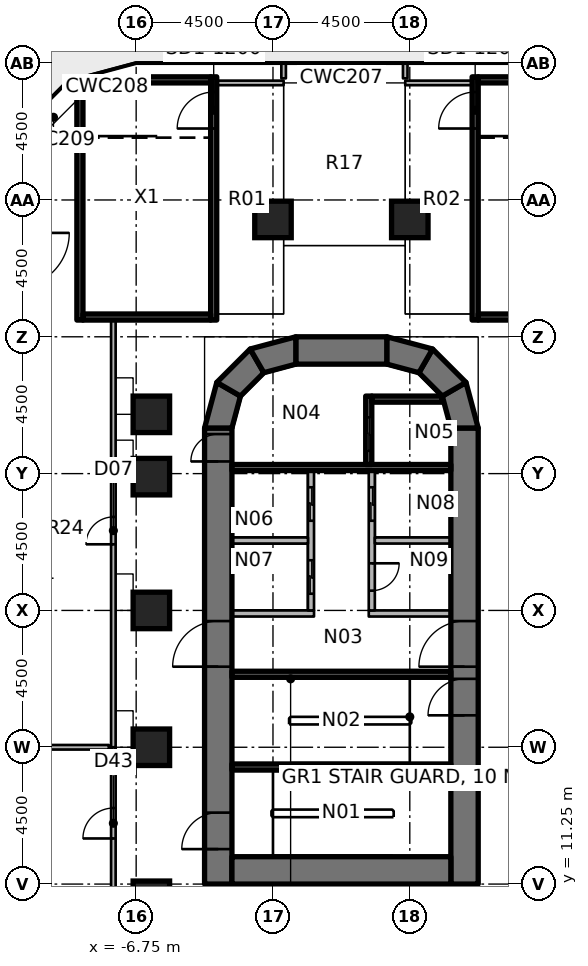
"""IFC4 building model, lengths in metres.
Left out: names, types, materials, properties, quantities, classifications, styles, units other than length and angle.
Written with IfcOpenShell. Run it as: python <this file> out.ifc"""

import sys

from ifc_helpers import new_model, si_unit, direction, frame, frame_2d, origin, origin_2d, place, context, subcontext, project, spatial, polyline, rectangle, outline, extrude, element, fill, save


model = new_model("IFC4")
c1 = context("Model", 3, precision=1e-05, world=origin(), true_north=direction((0.0, 1.0)))
c2 = subcontext(c1, "Body", "Model", "MODEL_VIEW")
j1 = project(units=[si_unit("LENGTHUNIT", "METRE"), si_unit("PLANEANGLEUNIT", "RADIAN")], contexts=[c1])
p1 = place(None, origin())
s1 = spatial("IfcSite", under=j1, at=p1, CompositionType="ELEMENT")
p2 = place(p1, origin())
s2 = spatial("IfcBuilding", under=s1, at=p2, CompositionType="ELEMENT")
p3 = place(p2, frame((0.0, 0.0, 22.0)))
s3 = spatial("IfcBuildingStorey", under=s2, at=p3, CompositionType="ELEMENT", Elevation=22.0)
for number, where, z_axis, x_axis in (
    (1, (-6.25, 10.75, 0.0), (0.0, 0.0, 1.0), (1.0, 0.0, 0.0)),
    (2, (-6.25, 15.75, 0.0), (0.0, 0.0, 1.0), (1.0, 0.0, 0.0)),
    (3, (-6.25, 20.25, 0.0), (0.0, 0.0, 1.0), (1.0, 0.0, 0.0)),
    (4, (-6.25, 24.65, 0.0), (0.0, 0.0, 1.0), (1.0, 0.0, 0.0)),
    (5, (-6.25, 26.7, 0.0), (0.0, 0.0, 1.0), (1.0, 0.0, 0.0)),
    (6, (-2.25, 33.11, 0.0), (0.0, 0.0, 1.0), (1.0, 0.0, 0.0)),
    (7, (2.25, 33.11, 0.0), (0.0, 0.0, 1.0), (1.0, 0.0, 0.0)),
):
    element("IfcColumn", number, at=place(p3, frame(where, z_axis=z_axis, x_axis=x_axis)), inside=s3, PredefinedType="COLUMN", context=c2, shape_type="SweptSolid", body=[
        extrude(rectangle(XDim=1.2, YDim=1.2, at=origin_2d()), origin(), (0.0, 0.0, 1.0), 4.85),
    ])
p4 = place(p3, frame((-4.05, 11.25, 0.0), z_axis=(0.0, 0.0, 1.0), x_axis=(0.0, 1.0, 0.0)))
e8 = element("IfcWall", 8, at=p4, inside=s3, PredefinedType="SHEAR", context=c2, shape_type="SweptSolid", body=[
    extrude(rectangle(XDim=15.0, YDim=0.9, at=frame_2d((7.5, 0.0))), origin(), (0.0, 0.0, 1.0), 5.0),
])
p5 = place(p4, frame((7.15, 0.0, 0.0)))
e9 = element("IfcOpeningElement", 9, at=p5, cuts=e8, PredefinedType="OPENING", context=c2, shape_type="SweptSolid", body=[
    extrude(rectangle(XDim=1.5, YDim=2.3, at=frame_2d((0.75, 1.15))), frame((0.0, 0.46, 0.0), z_axis=(0.0, -1.0, 0.0), x_axis=(1.0, 0.0, 0.0)), (0.0, 0.0, 1.0), 0.92),
])
p6 = place(p4, frame((13.9, 0.0, 0.0)))
e10 = element("IfcOpeningElement", 10, at=p6, cuts=e8, PredefinedType="OPENING", context=c2, shape_type="SweptSolid", body=[
    extrude(rectangle(XDim=0.9, YDim=2.1, at=frame_2d((0.45, 1.05))), frame((0.0, 0.46, 0.0), z_axis=(0.0, -1.0, 0.0), x_axis=(1.0, 0.0, 0.0)), (0.0, 0.0, 1.0), 0.92),
])
p7 = place(p4, frame((1.15, 0.0, 0.0)))
e11 = element("IfcOpeningElement", 11, at=p7, cuts=e8, PredefinedType="OPENING", context=c2, shape_type="SweptSolid", body=[
    extrude(rectangle(XDim=1.2, YDim=2.1, at=frame_2d((0.6, 1.05))), frame((0.0, 0.46, 0.0), z_axis=(0.0, -1.0, 0.0), x_axis=(1.0, 0.0, 0.0)), (0.0, 0.0, 1.0), 0.92),
])
p8 = place(p3, frame((4.05, 11.25, 0.0), z_axis=(0.0, 0.0, 1.0), x_axis=(0.0, 1.0, 0.0)))
e12 = element("IfcWall", 12, at=p8, inside=s3, PredefinedType="SHEAR", context=c2, shape_type="SweptSolid", body=[
    extrude(rectangle(XDim=15.0, YDim=0.9, at=frame_2d((7.5, 0.0))), origin(), (0.0, 0.0, 1.0), 5.0),
])
p9 = place(p8, frame((7.15, 0.0, 0.0)))
e13 = element("IfcOpeningElement", 13, at=p9, cuts=e12, PredefinedType="OPENING", context=c2, shape_type="SweptSolid", body=[
    extrude(rectangle(XDim=1.5, YDim=2.3, at=frame_2d((0.75, 1.15))), frame((0.0, 0.46, 0.0), z_axis=(0.0, -1.0, 0.0), x_axis=(1.0, 0.0, 0.0)), (0.0, 0.0, 1.0), 0.92),
])
p10 = place(p8, frame((5.55, 0.0, 0.0)))
e14 = element("IfcOpeningElement", 14, at=p10, cuts=e12, PredefinedType="OPENING", context=c2, shape_type="SweptSolid", body=[
    extrude(rectangle(XDim=1.2, YDim=2.1, at=frame_2d((0.6, 1.05))), frame((0.0, 0.46, 0.0), z_axis=(0.0, -1.0, 0.0), x_axis=(1.0, 0.0, 0.0)), (0.0, 0.0, 1.0), 0.92),
])
p11 = place(p3, frame((-3.6, 11.7, 0.0), z_axis=(0.0, 0.0, 1.0), x_axis=(1.0, 0.0, 0.0)))
e15 = element("IfcWall", 15, at=p11, inside=s3, PredefinedType="SHEAR", context=c2, shape_type="SweptSolid", body=[
    extrude(rectangle(XDim=7.2, YDim=0.9, at=frame_2d((3.6, 0.0))), origin(), (0.0, 0.0, 1.0), 5.0),
])
p12 = place(p3, frame((-1.5, 28.8, 0.0), z_axis=(0.0, 0.0, 1.0), x_axis=(1.0, 0.0, 0.0)))
e16 = element("IfcWall", 16, at=p12, inside=s3, PredefinedType="SHEAR", context=c2, shape_type="SweptSolid", body=[
    extrude(rectangle(XDim=3.0, YDim=0.9, at=frame_2d((1.5, 0.0))), origin(), (0.0, 0.0, 1.0), 5.0),
])
p13 = place(p3, origin())
e17 = element("IfcWall", 17, at=p13, inside=s3, PredefinedType="SHEAR", context=c2, shape_type="SweptSolid", body=[
    extrude(outline(polyline([(-4.5, 26.25), (-4.098, 27.75), (-3.319, 27.3), (-3.6, 26.25), (-4.5, 26.25)])), origin(), (0.0, 0.0, 1.0), 5.0),
])
p14 = place(p3, origin())
e18 = element("IfcWall", 18, at=p14, inside=s3, PredefinedType="SHEAR", context=c2, shape_type="SweptSolid", body=[
    extrude(outline(polyline([(-4.098, 27.75), (-3.0, 28.848), (-2.55, 28.069), (-3.319, 27.3), (-4.098, 27.75)])), origin(), (0.0, 0.0, 1.0), 5.0),
])
p15 = place(p3, origin())
e19 = element("IfcWall", 19, at=p15, inside=s3, PredefinedType="SHEAR", context=c2, shape_type="SweptSolid", body=[
    extrude(outline(polyline([(-3.0, 28.848), (-1.5, 29.25), (-1.5, 28.35), (-2.55, 28.069), (-3.0, 28.848)])), origin(), (0.0, 0.0, 1.0), 5.0),
])
p16 = place(p3, origin())
e20 = element("IfcWall", 20, at=p16, inside=s3, PredefinedType="SHEAR", context=c2, shape_type="SweptSolid", body=[
    extrude(outline(polyline([(4.5, 26.25), (4.098, 27.75), (3.319, 27.3), (3.6, 26.25), (4.5, 26.25)])), origin(), (0.0, 0.0, 1.0), 5.0),
])
p17 = place(p3, origin())
e21 = element("IfcWall", 21, at=p17, inside=s3, PredefinedType="SHEAR", context=c2, shape_type="SweptSolid", body=[
    extrude(outline(polyline([(4.098, 27.75), (3.0, 28.848), (2.55, 28.069), (3.319, 27.3), (4.098, 27.75)])), origin(), (0.0, 0.0, 1.0), 5.0),
])
p18 = place(p3, origin())
e22 = element("IfcWall", 22, at=p18, inside=s3, PredefinedType="SHEAR", context=c2, shape_type="SweptSolid", body=[
    extrude(outline(polyline([(3.0, 28.848), (1.5, 29.25), (1.5, 28.35), (2.55, 28.069), (3.0, 28.848)])), origin(), (0.0, 0.0, 1.0), 5.0),
])
p19 = place(p3, frame((-3.6, 24.95, 0.0), z_axis=(0.0, 0.0, 1.0), x_axis=(1.0, 0.0, 0.0)))
e23 = element("IfcWall", 23, at=p19, inside=s3, PredefinedType="SHEAR", context=c2, shape_type="SweptSolid", body=[
    extrude(rectangle(XDim=7.2, YDim=0.2, at=frame_2d((3.6, 0.0))), origin(), (0.0, 0.0, 1.0), 4.85),
])
p20 = place(p3, frame((0.9, 27.3, 0.0), z_axis=(0.0, 0.0, 1.0), x_axis=(0.0, -1.0, 0.0)))
e24 = element("IfcWall", 24, at=p20, inside=s3, PredefinedType="SHEAR", context=c2, shape_type="SweptSolid", body=[
    extrude(rectangle(XDim=2.25, YDim=0.2, at=frame_2d((1.125, 0.0))), origin(), (0.0, 0.0, 1.0), 4.85),
])
p21 = place(p20, frame((0.7, 0.0, 0.0)))
e25 = element("IfcOpeningElement", 25, at=p21, cuts=e24, PredefinedType="OPENING", context=c2, shape_type="SweptSolid", body=[
    extrude(rectangle(XDim=1.1, YDim=2.3, at=frame_2d((0.55, 1.15))), frame((0.0, 0.11, 0.0), z_axis=(0.0, -1.0, 0.0), x_axis=(1.0, 0.0, 0.0)), (0.0, 0.0, 1.0), 0.22),
])
p22 = place(p3, origin())
e26 = element("IfcWall", 26, at=p22, inside=s3, PredefinedType="SHEAR", context=c2, shape_type="SweptSolid", body=[
    extrude(outline(polyline([(1.0, 27.1), (3.341, 27.1), (3.291, 27.284), (3.275, 27.3), (1.0, 27.3), (1.0, 27.1)])), origin(), (0.0, 0.0, 1.0), 4.85),
])
for number, where, z_axis, x_axis in (
    (27, (-3.6, 18.15, 0.0), (0.0, 0.0, 1.0), (1.0, 0.0, 0.0)),
    (28, (-3.6, 15.1, 0.0), (0.0, 0.0, 1.0), (1.0, 0.0, 0.0)),
):
    element("IfcWall", number, at=place(p3, frame(where, z_axis=z_axis, x_axis=x_axis)), inside=s3, PredefinedType="SHEAR", context=c2, shape_type="SweptSolid", body=[
        extrude(rectangle(XDim=7.2, YDim=0.2, at=frame_2d((3.6, 0.0))), origin(), (0.0, 0.0, 1.0), 4.85),
    ])
p23 = place(p3, frame((-3.6, 20.15, 0.0), z_axis=(0.0, 0.0, 1.0), x_axis=(1.0, 0.0, 0.0)))
e29 = element("IfcWall", 29, at=p23, inside=s3, PredefinedType="PARTITIONING", context=c2, shape_type="SweptSolid", body=[
    extrude(rectangle(XDim=2.7, YDim=0.2, at=frame_2d((1.35, 0.0))), origin(), (0.0, 0.0, 1.0), 4.85),
])
p24 = place(p3, frame((-1.0, 24.85, 0.0), z_axis=(0.0, 0.0, 1.0), x_axis=(0.0, -1.0, 0.0)))
e30 = element("IfcWall", 30, at=p24, inside=s3, PredefinedType="PARTITIONING", context=c2, shape_type="SweptSolid", body=[
    extrude(rectangle(XDim=4.6, YDim=0.2, at=frame_2d((2.3, 0.0))), origin(), (0.0, 0.0, 1.0), 4.85),
])
p25 = place(p24, frame((0.55, 0.0, 0.0)))
e31 = element("IfcOpeningElement", 31, at=p25, cuts=e30, PredefinedType="OPENING", context=c2, shape_type="SweptSolid", body=[
    extrude(rectangle(XDim=1.1, YDim=2.3, at=frame_2d((0.55, 1.15))), frame((0.0, 0.11, 0.0), z_axis=(0.0, -1.0, 0.0), x_axis=(1.0, 0.0, 0.0)), (0.0, 0.0, 1.0), 0.22),
])
p26 = place(p24, frame((2.95, 0.0, 0.0)))
e32 = element("IfcOpeningElement", 32, at=p26, cuts=e30, PredefinedType="OPENING", context=c2, shape_type="SweptSolid", body=[
    extrude(rectangle(XDim=1.1, YDim=2.3, at=frame_2d((0.55, 1.15))), frame((0.0, 0.11, 0.0), z_axis=(0.0, -1.0, 0.0), x_axis=(1.0, 0.0, 0.0)), (0.0, 0.0, 1.0), 0.22),
])
p27 = place(p3, frame((0.9, 20.15, 0.0), z_axis=(0.0, 0.0, 1.0), x_axis=(1.0, 0.0, 0.0)))
e33 = element("IfcWall", 33, at=p27, inside=s3, PredefinedType="PARTITIONING", context=c2, shape_type="SweptSolid", body=[
    extrude(rectangle(XDim=2.7, YDim=0.2, at=frame_2d((1.35, 0.0))), origin(), (0.0, 0.0, 1.0), 4.85),
])
p28 = place(p3, frame((1.0, 24.85, 0.0), z_axis=(0.0, 0.0, 1.0), x_axis=(0.0, -1.0, 0.0)))
e34 = element("IfcWall", 34, at=p28, inside=s3, PredefinedType="PARTITIONING", context=c2, shape_type="SweptSolid", body=[
    extrude(rectangle(XDim=4.6, YDim=0.2, at=frame_2d((2.3, 0.0))), origin(), (0.0, 0.0, 1.0), 4.85),
])
p29 = place(p28, frame((0.55, 0.0, 0.0)))
e35 = element("IfcOpeningElement", 35, at=p29, cuts=e34, PredefinedType="OPENING", context=c2, shape_type="SweptSolid", body=[
    extrude(rectangle(XDim=1.1, YDim=2.3, at=frame_2d((0.55, 1.15))), frame((0.0, 0.11, 0.0), z_axis=(0.0, -1.0, 0.0), x_axis=(1.0, 0.0, 0.0)), (0.0, 0.0, 1.0), 0.22),
])
p30 = place(p28, frame((3.05, 0.0, 0.0)))
e36 = element("IfcOpeningElement", 36, at=p30, cuts=e34, PredefinedType="OPENING", context=c2, shape_type="SweptSolid", body=[
    extrude(rectangle(XDim=0.9, YDim=2.1, at=frame_2d((0.45, 1.05))), frame((0.0, 0.11, 0.0), z_axis=(0.0, -1.0, 0.0), x_axis=(1.0, 0.0, 0.0)), (0.0, 0.0, 1.0), 0.22),
])
for number, where, z_axis, x_axis in (
    (37, (-3.6, 22.55, 0.0), (0.0, 0.0, 1.0), (1.0, 0.0, 0.0)),
    (38, (1.1, 22.55, 0.0), (0.0, 0.0, 1.0), (1.0, 0.0, 0.0)),
):
    element("IfcWall", number, at=place(p3, frame(where, z_axis=z_axis, x_axis=x_axis)), inside=s3, PredefinedType="PARTITIONING", context=c2, shape_type="SweptSolid", body=[
        extrude(rectangle(XDim=2.5, YDim=0.2, at=frame_2d((1.25, 0.0))), origin(), (0.0, 0.0, 1.0), 4.85),
    ])
p31 = place(p3, frame((-8.6, 29.8, 0.0), z_axis=(0.0, 0.0, 1.0), x_axis=(0.0, 1.0, 0.0)))
e39 = element("IfcWall", 39, at=p31, inside=s3, PredefinedType="SHEAR", context=c2, shape_type="SweptSolid", body=[
    extrude(rectangle(XDim=8.0, YDim=0.2, at=frame_2d((4.0, 0.0))), origin(), (0.0, 0.0, 1.0), 4.55),
])
p32 = place(p3, frame((-4.2, 29.8, 0.0), z_axis=(0.0, 0.0, 1.0), x_axis=(0.0, 1.0, 0.0)))
e40 = element("IfcWall", 40, at=p32, inside=s3, PredefinedType="SHEAR", context=c2, shape_type="SweptSolid", body=[
    extrude(rectangle(XDim=8.0, YDim=0.2, at=frame_2d((4.0, 0.0))), origin(), (0.0, 0.0, 1.0), 4.55),
])
p33 = place(p32, frame((6.3, 0.0, 0.0)))
e41 = element("IfcOpeningElement", 41, at=p33, cuts=e40, PredefinedType="OPENING", context=c2, shape_type="SweptSolid", body=[
    extrude(rectangle(XDim=1.2, YDim=2.1, at=frame_2d((0.6, 1.05))), frame((0.0, 0.11, 0.0), z_axis=(0.0, -1.0, 0.0), x_axis=(1.0, 0.0, 0.0)), (0.0, 0.0, 1.0), 0.22),
])
for number, where, z_axis, x_axis in (
    (42, (-8.5, 29.9, 0.0), (0.0, 0.0, 1.0), (1.0, 0.0, 0.0)),
    (43, (-8.5, 37.7, 0.0), (0.0, 0.0, 1.0), (1.0, 0.0, 0.0)),
):
    element("IfcWall", number, at=place(p3, frame(where, z_axis=z_axis, x_axis=x_axis)), inside=s3, PredefinedType="SHEAR", context=c2, shape_type="SweptSolid", body=[
        extrude(rectangle(XDim=4.2, YDim=0.2, at=frame_2d((2.1, 0.0))), origin(), (0.0, 0.0, 1.0), 4.55),
    ])
p34 = place(p3, frame((4.4, 29.8, 0.0), z_axis=(0.0, 0.0, 1.0), x_axis=(0.0, 1.0, 0.0)))
e44 = element("IfcWall", 44, at=p34, inside=s3, PredefinedType="SHEAR", context=c2, shape_type="SweptSolid", body=[
    extrude(rectangle(XDim=8.0, YDim=0.2, at=frame_2d((4.0, 0.0))), origin(), (0.0, 0.0, 1.0), 4.55),
])
p35 = place(p34, frame((6.3, 0.0, 0.0)))
e45 = element("IfcOpeningElement", 45, at=p35, cuts=e44, PredefinedType="OPENING", context=c2, shape_type="SweptSolid", body=[
    extrude(rectangle(XDim=1.2, YDim=2.1, at=frame_2d((0.6, 1.05))), frame((0.0, 0.11, 0.0), z_axis=(0.0, -1.0, 0.0), x_axis=(1.0, 0.0, 0.0)), (0.0, 0.0, 1.0), 0.22),
])
for number, where, z_axis, x_axis in (
    (46, (4.5, 29.9, 0.0), (0.0, 0.0, 1.0), (1.0, 0.0, 0.0)),
    (47, (4.5, 37.7, 0.0), (0.0, 0.0, 1.0), (1.0, 0.0, 0.0)),
):
    element("IfcWall", number, at=place(p3, frame(where, z_axis=z_axis, x_axis=x_axis)), inside=s3, PredefinedType="SHEAR", context=c2, shape_type="SweptSolid", body=[
        extrude(rectangle(XDim=4.2, YDim=0.2, at=frame_2d((2.1, 0.0))), origin(), (0.0, 0.0, 1.0), 4.55),
    ])
p36 = place(p3, frame((-4.1, 37.6, 0.0), z_axis=(0.0, 0.0, 1.0), x_axis=(1.0, 0.0, 0.0)))
e48 = element("IfcWall", 48, at=p36, inside=s3, PredefinedType="PARTITIONING", context=c2, shape_type="SweptSolid", body=[
    extrude(rectangle(XDim=2.2, YDim=0.15, at=frame_2d((1.1, 0.0))), origin(), (0.0, 0.0, 1.0), 4.55),
])
p37 = place(p3, frame((2.1, 37.6, 0.0), z_axis=(0.0, 0.0, 1.0), x_axis=(1.0, 0.0, 0.0)))
e49 = element("IfcWall", 49, at=p37, inside=s3, PredefinedType="PARTITIONING", context=c2, shape_type="SweptSolid", body=[
    extrude(rectangle(XDim=2.2, YDim=0.15, at=frame_2d((1.1, 0.0))), origin(), (0.0, 0.0, 1.0), 4.55),
])
p38 = place(p3, frame((-7.5, 8.25, 0.0), z_axis=(0.0, 0.0, 1.0), x_axis=(0.0, 1.0, 0.0)))
e50 = element("IfcWall", 50, at=p38, inside=s3, PredefinedType="PARTITIONING", context=c2, shape_type="SweptSolid", body=[
    extrude(rectangle(XDim=7.5, YDim=0.15, at=frame_2d((3.75, 0.0))), origin(), (0.0, 0.0, 1.0), 3.93),
])
p39 = place(p38, frame((4.5, 0.0, 0.0)))
e51 = element("IfcOpeningElement", 51, at=p39, cuts=e50, PredefinedType="OPENING", context=c2, shape_type="SweptSolid", body=[
    extrude(rectangle(XDim=1.0, YDim=2.1, at=frame_2d((0.5, 1.05))), frame((0.0, 0.085, 0.0), z_axis=(0.0, -1.0, 0.0), x_axis=(1.0, 0.0, 0.0)), (0.0, 0.0, 1.0), 0.17),
])
p40 = place(p3, frame((-7.5, 15.75, 0.0), z_axis=(0.0, 0.0, 1.0), x_axis=(0.0, 1.0, 0.0)))
e52 = element("IfcWall", 52, at=p40, inside=s3, PredefinedType="PARTITIONING", context=c2, shape_type="SweptSolid", body=[
    extrude(rectangle(XDim=14.25, YDim=0.15, at=frame_2d((7.125, 0.0))), origin(), (0.0, 0.0, 1.0), 4.55),
])
p41 = place(p40, frame((6.675, 0.0, 0.0)))
e53 = element("IfcOpeningElement", 53, at=p41, cuts=e52, PredefinedType="OPENING", context=c2, shape_type="SweptSolid", body=[
    extrude(rectangle(XDim=0.9, YDim=2.1, at=frame_2d((0.45, 1.05))), frame((0.0, 0.085, 0.0), z_axis=(0.0, -1.0, 0.0), x_axis=(1.0, 0.0, 0.0)), (0.0, 0.0, 1.0), 0.17),
])
for number, where, z_axis, x_axis in (
    (54, (2.1, 38.25, 0.0), (0.0, 0.0, 1.0), (0.0, -1.0, 0.0)),
    (55, (-1.9, 37.75, 0.0), (0.0, 0.0, 1.0), (0.0, 1.0, 0.0)),
):
    element("IfcWall", number, at=place(p3, frame(where, z_axis=z_axis, x_axis=x_axis)), inside=s3, PredefinedType="PARTITIONING", context=c2, shape_type="SweptSolid", body=[
        extrude(rectangle(XDim=0.5, YDim=0.15, at=frame_2d((0.25, 0.0))), origin(), (0.0, 0.0, 1.0), 4.55),
    ])
p42 = place(p3, frame((-10.05, 15.75, 0.0), z_axis=(0.0, 0.0, 1.0), x_axis=(1.0, 0.0, 0.0)))
e56 = element("IfcWall", 56, at=p42, inside=s3, PredefinedType="PARTITIONING", context=c2, shape_type="SweptSolid", body=[
    extrude(rectangle(XDim=2.4, YDim=0.15, at=frame_2d((1.2, 0.0))), origin(), (0.0, 0.0, 1.0), 4.55),
])
p43 = place(p5, origin())
e57 = element("IfcDoor", 57, at=p43, inside=s3, OperationType="DOUBLE_DOOR_SINGLE_SWING", PredefinedType="DOOR", context=c2, shape_type="SweptSolid", body=[
    extrude(rectangle(XDim=1.5, YDim=2.3, at=frame_2d((0.75, 1.15))), frame((0.0, 0.025, 0.0), z_axis=(0.0, -1.0, 0.0), x_axis=(1.0, 0.0, 0.0)), (0.0, 0.0, 1.0), 0.05),
])
fill(e9, e57)
p44 = place(p9, origin())
e58 = element("IfcDoor", 58, at=p44, inside=s3, OperationType="DOUBLE_DOOR_SINGLE_SWING", PredefinedType="DOOR", context=c2, shape_type="SweptSolid", body=[
    extrude(rectangle(XDim=1.5, YDim=2.3, at=frame_2d((0.75, 1.15))), frame((0.0, 0.025, 0.0), z_axis=(0.0, -1.0, 0.0), x_axis=(1.0, 0.0, 0.0)), (0.0, 0.0, 1.0), 0.05),
])
fill(e13, e58)
p45 = place(p6, origin())
e59 = element("IfcDoor", 59, at=p45, inside=s3, OperationType="SINGLE_SWING_RIGHT", PredefinedType="DOOR", context=c2, shape_type="SweptSolid", body=[
    extrude(rectangle(XDim=0.9, YDim=2.1, at=frame_2d((0.45, 1.05))), frame((0.0, 0.025, 0.0), z_axis=(0.0, -1.0, 0.0), x_axis=(1.0, 0.0, 0.0)), (0.0, 0.0, 1.0), 0.05),
])
fill(e10, e59)
p46 = place(p10, origin())
e60 = element("IfcDoor", 60, at=p46, inside=s3, OperationType="SINGLE_SWING_RIGHT", PredefinedType="DOOR", context=c2, shape_type="SweptSolid", body=[
    extrude(rectangle(XDim=1.2, YDim=2.1, at=frame_2d((0.6, 1.05))), frame((0.0, 0.025, 0.0), z_axis=(0.0, -1.0, 0.0), x_axis=(1.0, 0.0, 0.0)), (0.0, 0.0, 1.0), 0.05),
])
fill(e14, e60)
p47 = place(p7, origin())
e61 = element("IfcDoor", 61, at=p47, inside=s3, OperationType="SINGLE_SWING_RIGHT", PredefinedType="DOOR", context=c2, shape_type="SweptSolid", body=[
    extrude(rectangle(XDim=1.2, YDim=2.1, at=frame_2d((0.6, 1.05))), frame((0.0, 0.025, 0.0), z_axis=(0.0, -1.0, 0.0), x_axis=(1.0, 0.0, 0.0)), (0.0, 0.0, 1.0), 0.05),
])
fill(e11, e61)
p48 = place(p21, origin())
e62 = element("IfcDoor", 62, at=p48, inside=s3, OperationType="DOUBLE_DOOR_SLIDING", PredefinedType="DOOR", context=c2, shape_type="SweptSolid", body=[
    extrude(rectangle(XDim=1.1, YDim=2.3, at=frame_2d((0.55, 1.15))), frame((0.0, 0.025, 0.0), z_axis=(0.0, -1.0, 0.0), x_axis=(1.0, 0.0, 0.0)), (0.0, 0.0, 1.0), 0.05),
])
fill(e25, e62)
p49 = place(p25, origin())
e63 = element("IfcDoor", 63, at=p49, inside=s3, OperationType="DOUBLE_DOOR_SLIDING", PredefinedType="DOOR", context=c2, shape_type="SweptSolid", body=[
    extrude(rectangle(XDim=1.1, YDim=2.3, at=frame_2d((0.55, 1.15))), frame((0.0, 0.025, 0.0), z_axis=(0.0, -1.0, 0.0), x_axis=(1.0, 0.0, 0.0)), (0.0, 0.0, 1.0), 0.05),
])
fill(e31, e63)
p50 = place(p26, origin())
e64 = element("IfcDoor", 64, at=p50, inside=s3, OperationType="DOUBLE_DOOR_SLIDING", PredefinedType="DOOR", context=c2, shape_type="SweptSolid", body=[
    extrude(rectangle(XDim=1.1, YDim=2.3, at=frame_2d((0.55, 1.15))), frame((0.0, 0.025, 0.0), z_axis=(0.0, -1.0, 0.0), x_axis=(1.0, 0.0, 0.0)), (0.0, 0.0, 1.0), 0.05),
])
fill(e32, e64)
p51 = place(p29, origin())
e65 = element("IfcDoor", 65, at=p51, inside=s3, OperationType="DOUBLE_DOOR_SLIDING", PredefinedType="DOOR", context=c2, shape_type="SweptSolid", body=[
    extrude(rectangle(XDim=1.1, YDim=2.3, at=frame_2d((0.55, 1.15))), frame((0.0, 0.025, 0.0), z_axis=(0.0, -1.0, 0.0), x_axis=(1.0, 0.0, 0.0)), (0.0, 0.0, 1.0), 0.05),
])
fill(e35, e65)
p52 = place(p30, origin())
e66 = element("IfcDoor", 66, at=p52, inside=s3, OperationType="SINGLE_SWING_RIGHT", PredefinedType="DOOR", context=c2, shape_type="SweptSolid", body=[
    extrude(rectangle(XDim=0.9, YDim=2.1, at=frame_2d((0.45, 1.05))), frame((0.0, 0.025, 0.0), z_axis=(0.0, -1.0, 0.0), x_axis=(1.0, 0.0, 0.0)), (0.0, 0.0, 1.0), 0.05),
])
fill(e36, e66)
p53 = place(p33, origin())
e67 = element("IfcDoor", 67, at=p53, inside=s3, OperationType="SINGLE_SWING_RIGHT", PredefinedType="DOOR", context=c2, shape_type="SweptSolid", body=[
    extrude(rectangle(XDim=1.2, YDim=2.1, at=frame_2d((0.6, 1.05))), frame((0.0, 0.025, 0.0), z_axis=(0.0, -1.0, 0.0), x_axis=(1.0, 0.0, 0.0)), (0.0, 0.0, 1.0), 0.05),
])
fill(e41, e67)
p54 = place(p35, origin())
e68 = element("IfcDoor", 68, at=p54, inside=s3, OperationType="SINGLE_SWING_LEFT", PredefinedType="DOOR", context=c2, shape_type="SweptSolid", body=[
    extrude(rectangle(XDim=1.2, YDim=2.1, at=frame_2d((0.6, 1.05))), frame((0.0, 0.025, 0.0), z_axis=(0.0, -1.0, 0.0), x_axis=(1.0, 0.0, 0.0)), (0.0, 0.0, 1.0), 0.05),
])
fill(e45, e68)
p55 = place(p39, origin())
e69 = element("IfcDoor", 69, at=p55, inside=s3, OperationType="SINGLE_SWING_LEFT", PredefinedType="DOOR", context=c2, shape_type="SweptSolid", body=[
    extrude(rectangle(XDim=1.0, YDim=2.1, at=frame_2d((0.5, 1.05))), frame((0.0, 0.025, 0.0), z_axis=(0.0, -1.0, 0.0), x_axis=(1.0, 0.0, 0.0)), (0.0, 0.0, 1.0), 0.05),
])
fill(e51, e69)
p56 = place(p41, origin())
e70 = element("IfcDoor", 70, at=p56, inside=s3, OperationType="SINGLE_SWING_LEFT", PredefinedType="DOOR", context=c2, shape_type="SweptSolid", body=[
    extrude(rectangle(XDim=0.9, YDim=2.1, at=frame_2d((0.45, 1.05))), frame((0.0, 0.025, 0.0), z_axis=(0.0, -1.0, 0.0), x_axis=(1.0, 0.0, 0.0)), (0.0, 0.0, 1.0), 0.05),
])
fill(e53, e70)
save(model, sys.argv[1])
